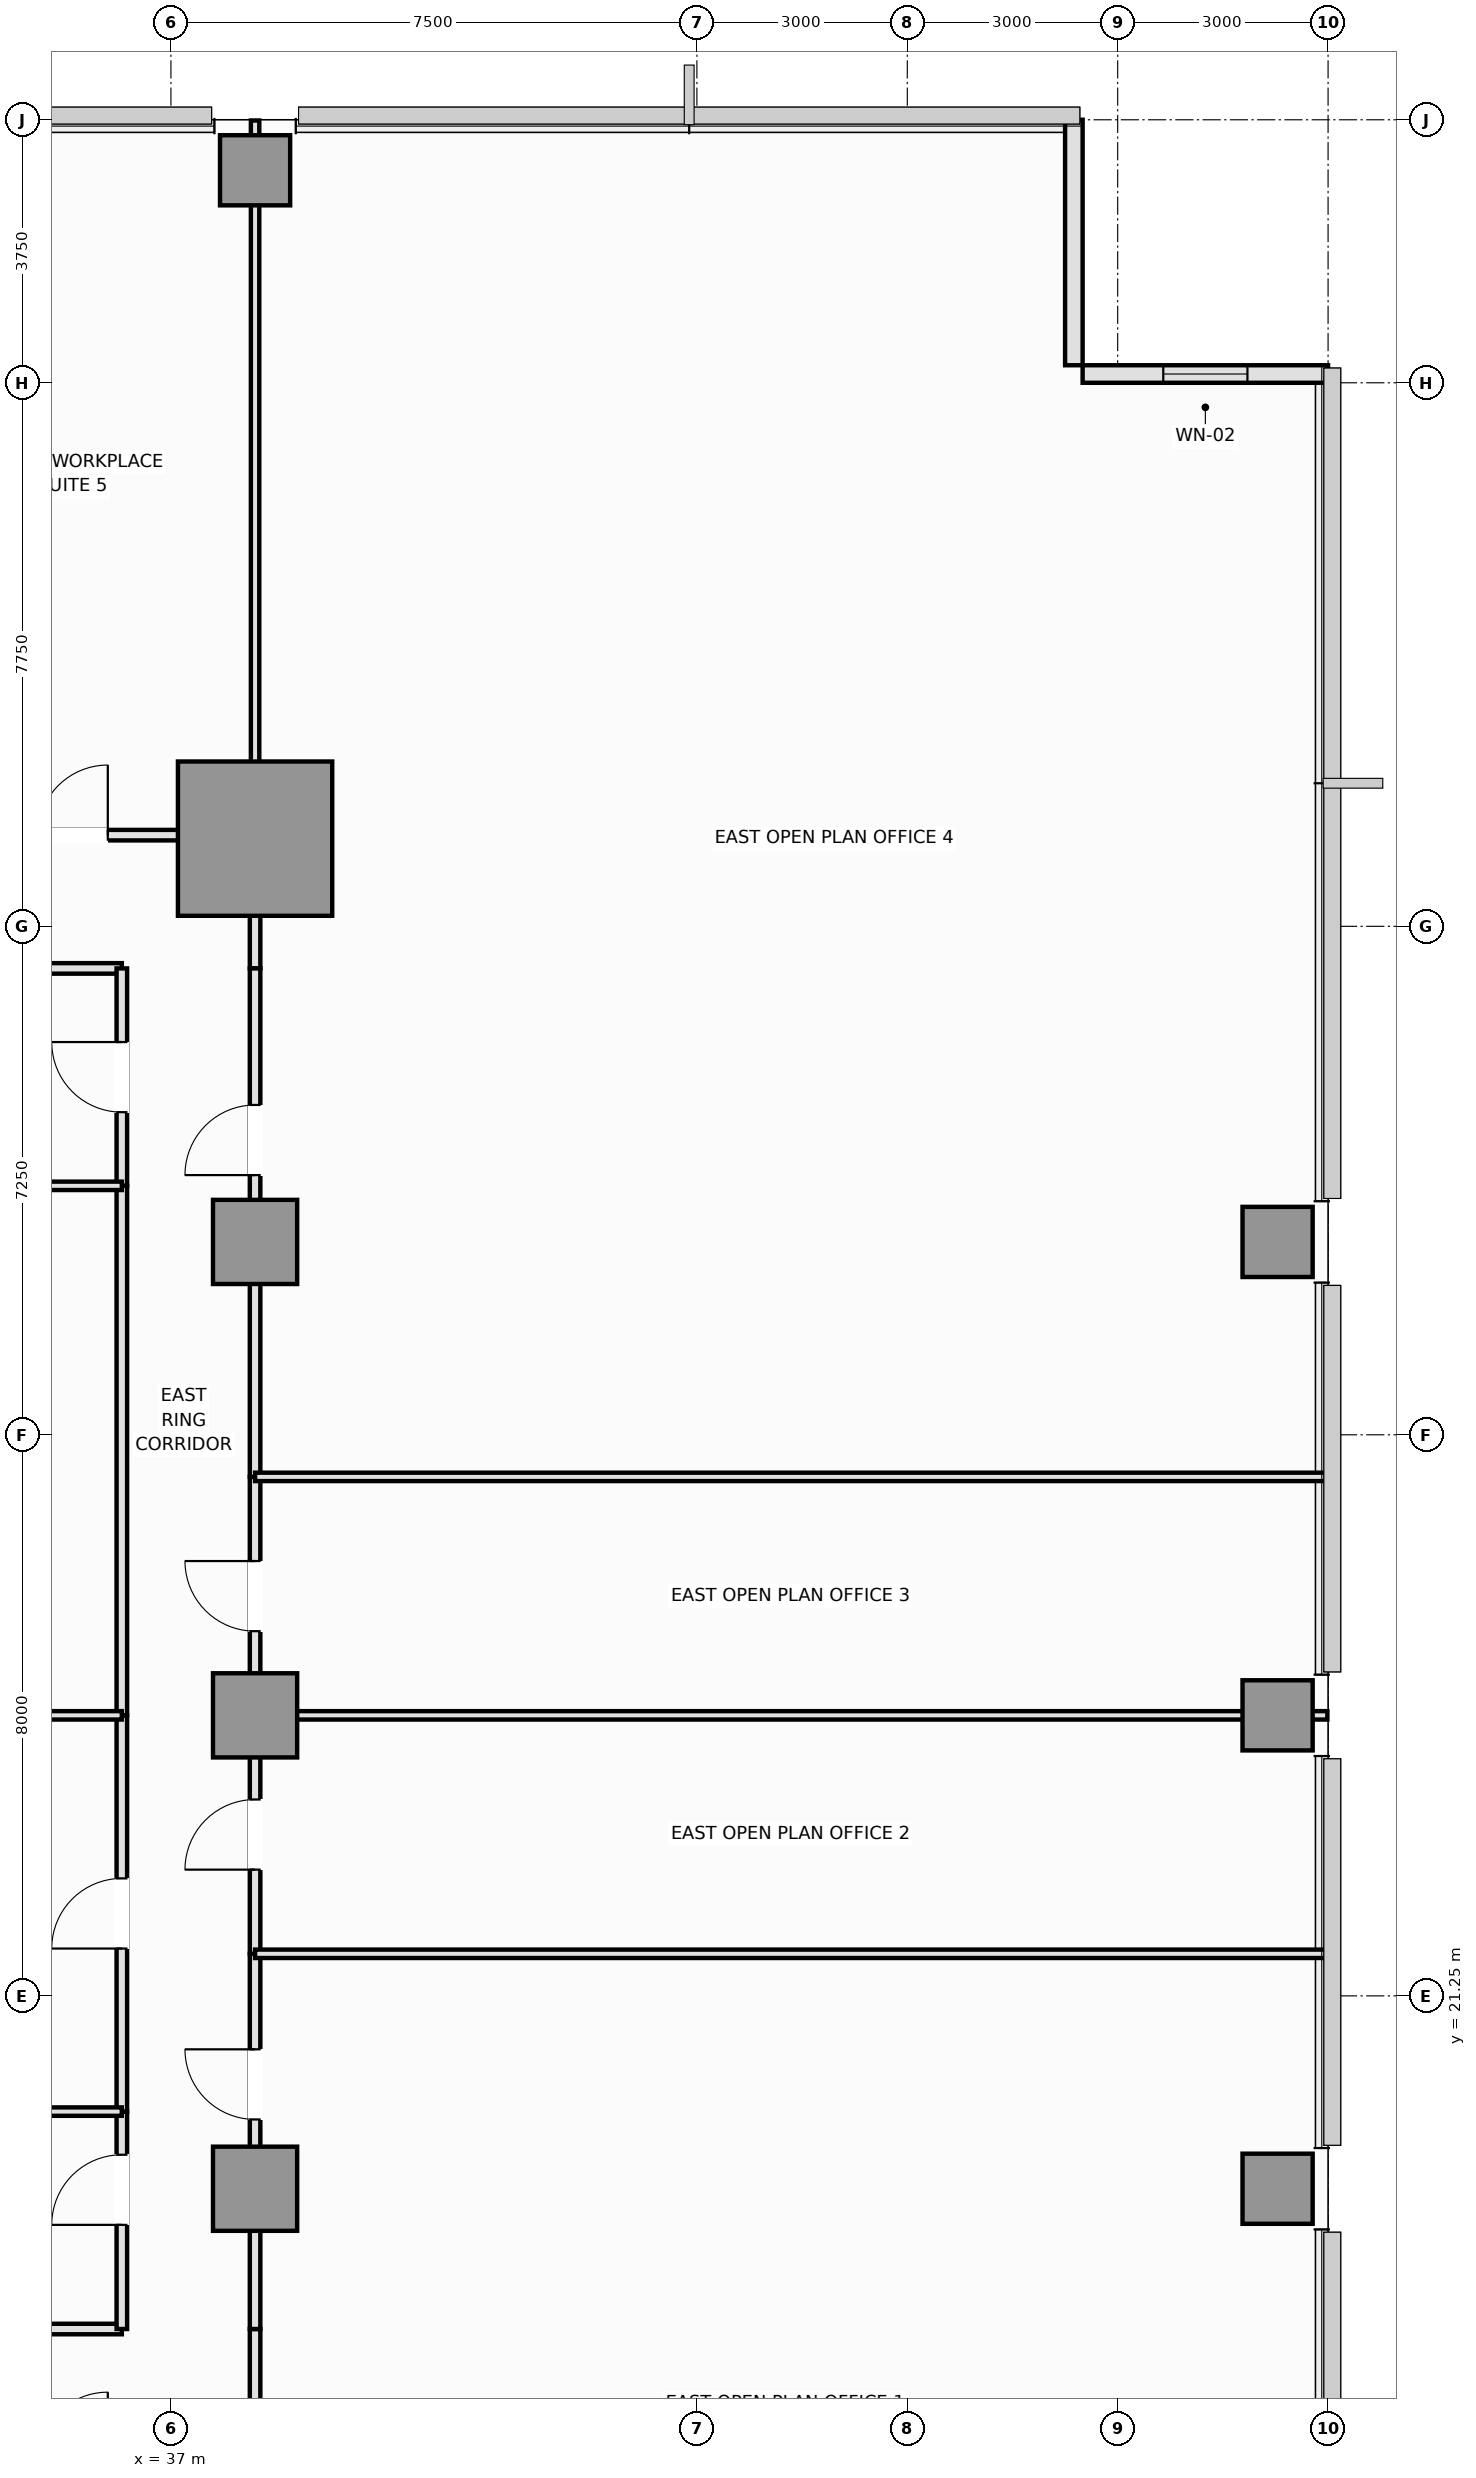
"""IFC4 building model, lengths in metres.
Left out: names, types, materials, properties, quantities, classifications, styles, units other than length and angle.
Written with IfcOpenShell. Run it as: python <this file> out.ifc"""

import sys

from ifc_helpers import new_model, si_unit, direction, frame, frame_2d, origin, origin_2d, place, context, subcontext, project, spatial, rectangle, extrude, element, fill, save


model = new_model("IFC4")
c1 = context("Model", 3, precision=1e-05, world=origin(), true_north=direction((0.0, 1.0)))
c2 = subcontext(c1, "Body", "Model", "MODEL_VIEW")
j1 = project(units=[si_unit("LENGTHUNIT", "METRE"), si_unit("PLANEANGLEUNIT", "RADIAN")], contexts=[c1])
p1 = place(None, origin())
s1 = spatial("IfcSite", under=j1, at=p1, CompositionType="ELEMENT")
p2 = place(p1, origin())
s2 = spatial("IfcBuilding", under=s1, at=p2, CompositionType="ELEMENT")
p3 = place(p2, frame((0.0, 0.0, 57.55)))
s3 = spatial("IfcBuildingStorey", under=s2, at=p3, CompositionType="ELEMENT", Elevation=57.55)
p4 = place(p3, frame((38.2, 37.75, 0.0), z_axis=(0.0, 0.0, 1.0), x_axis=(1.0, 0.0, 0.0)))
e1 = element("IfcColumn", 1, at=p4, inside=s3, PredefinedType="COLUMN", context=c2, shape_type="SweptSolid", body=[
    extrude(rectangle(XDim=2.2, YDim=2.2, at=origin_2d()), origin(), (0.0, 0.0, 1.0), 3.55),
])
for number, where, z_axis, x_axis in (
    (2, (38.2, 18.5, 0.0), (0.0, 0.0, 1.0), (1.0, 0.0, 0.0)),
    (3, (38.2, 25.25, 0.0), (0.0, 0.0, 1.0), (1.0, 0.0, 0.0)),
    (4, (38.2, 32.0, 0.0), (0.0, 0.0, 1.0), (1.0, 0.0, 0.0)),
):
    element("IfcColumn", number, at=place(p3, frame(where, z_axis=z_axis, x_axis=x_axis)), inside=s3, PredefinedType="COLUMN", context=c2, shape_type="SweptSolid", body=[
        extrude(rectangle(XDim=1.2, YDim=1.2, at=origin_2d()), origin(), (0.0, 0.0, 1.0), 3.55),
    ])
for number, where, z_axis, x_axis in (
    (5, (52.78, 18.5, 0.0), (0.0, 0.0, 1.0), (1.0, 0.0, 0.0)),
    (6, (52.78, 25.25, 0.0), (0.0, 0.0, 1.0), (1.0, 0.0, 0.0)),
    (7, (52.78, 32.0, 0.0), (0.0, 0.0, 1.0), (1.0, 0.0, 0.0)),
    (8, (38.2, 47.28, 0.0), (0.0, 0.0, 1.0), (1.0, 0.0, 0.0)),
):
    element("IfcColumn", number, at=place(p3, frame(where, z_axis=z_axis, x_axis=x_axis)), inside=s3, PredefinedType="COLUMN", context=c2, shape_type="SweptSolid", body=[
        extrude(rectangle(XDim=1.0, YDim=1.0, at=origin_2d()), origin(), (0.0, 0.0, 1.0), 3.55),
    ])
p5 = place(p3, frame((53.5, 44.375, 0.0), z_axis=(0.0, 0.0, 1.0), x_axis=(-1.0, 0.0, 0.0)))
e9 = element("IfcWall", 9, at=p5, inside=s3, PredefinedType="SOLIDWALL", context=c2, shape_type="SweptSolid", body=[
    extrude(rectangle(XDim=3.5, YDim=0.25, at=frame_2d((1.75, 0.0))), origin(), (0.0, 0.0, 1.0), 3.37),
])
p6 = place(p5, frame((1.15, 0.0, 0.9)))
e10 = element("IfcOpeningElement", 10, at=p6, cuts=e9, PredefinedType="OPENING", context=c2, shape_type="SweptSolid", body=[
    extrude(rectangle(XDim=1.2, YDim=1.8, at=frame_2d((0.6, 0.9))), frame((0.0, 0.135, 0.0), z_axis=(0.0, -1.0, 0.0), x_axis=(1.0, 0.0, 0.0)), (0.0, 0.0, 1.0), 0.27),
])
p7 = place(p3, frame((49.875, 44.5, 0.0), z_axis=(0.0, 0.0, 1.0), x_axis=(0.0, 1.0, 0.0)))
e11 = element("IfcWall", 11, at=p7, inside=s3, PredefinedType="SOLIDWALL", context=c2, shape_type="SweptSolid", body=[
    extrude(rectangle(XDim=3.5, YDim=0.25, at=frame_2d((1.75, 0.0))), origin(), (0.0, 0.0, 1.0), 3.37),
])
p8 = place(p3, frame((29.8, 16.5, 0.0), z_axis=(0.0, 0.0, 1.0), x_axis=(1.0, 0.0, 0.0)))
e12 = element("IfcWall", 12, at=p8, inside=s3, PredefinedType="PARTITIONING", context=c2, shape_type="SweptSolid", body=[
    extrude(rectangle(XDim=6.5, YDim=0.15, at=frame_2d((3.25, 0.0))), origin(), (0.0, 0.0, 1.0), 3.37),
])
p9 = place(p3, frame((38.2, 14.6, 0.0), z_axis=(0.0, 0.0, 1.0), x_axis=(0.0, 1.0, 0.0)))
e13 = element("IfcWall", 13, at=p9, inside=s3, PredefinedType="PARTITIONING", context=c2, shape_type="SweptSolid", body=[
    extrude(rectangle(XDim=1.9, YDim=0.15, at=frame_2d((0.95, 0.0))), origin(), (0.0, 0.0, 1.0), 2.82),
])
p10 = place(p3, frame((29.8, 35.9, 0.0), z_axis=(0.0, 0.0, 1.0), x_axis=(1.0, 0.0, 0.0)))
e14 = element("IfcWall", 14, at=p10, inside=s3, PredefinedType="PARTITIONING", context=c2, shape_type="SweptSolid", body=[
    extrude(rectangle(XDim=6.5, YDim=0.15, at=frame_2d((3.25, 0.0))), origin(), (0.0, 0.0, 1.0), 3.37),
])
p11 = place(p3, frame((33.0, 37.8, 0.0), z_axis=(0.0, 0.0, 1.0), x_axis=(1.0, 0.0, 0.0)))
e15 = element("IfcWall", 15, at=p11, inside=s3, PredefinedType="PARTITIONING", context=c2, shape_type="SweptSolid", body=[
    extrude(rectangle(XDim=5.2, YDim=0.15, at=frame_2d((2.6, 0.0))), origin(), (0.0, 0.0, 1.0), 2.72),
])
p12 = place(p11, frame((2.1, 0.0, 0.0)))
e16 = element("IfcOpeningElement", 16, at=p12, cuts=e15, PredefinedType="OPENING", context=c2, shape_type="SweptSolid", body=[
    extrude(rectangle(XDim=1.0, YDim=2.15, at=frame_2d((0.5, 1.075))), frame((0.0, 0.085, 0.0), z_axis=(0.0, -1.0, 0.0), x_axis=(1.0, 0.0, 0.0)), (0.0, 0.0, 1.0), 0.17),
])
p13 = place(p3, frame((38.2, 35.9, 0.0), z_axis=(0.0, 0.0, 1.0), x_axis=(0.0, 1.0, 0.0)))
e17 = element("IfcWall", 17, at=p13, inside=s3, PredefinedType="PARTITIONING", context=c2, shape_type="SweptSolid", body=[
    extrude(rectangle(XDim=1.9, YDim=0.15, at=frame_2d((0.95, 0.0))), origin(), (0.0, 0.0, 1.0), 2.82),
])
p14 = place(p3, frame((36.3, 16.5, 0.0), z_axis=(0.0, 0.0, 1.0), x_axis=(0.0, 1.0, 0.0)))
e18 = element("IfcWall", 18, at=p14, inside=s3, PredefinedType="PARTITIONING", context=c2, shape_type="SweptSolid", body=[
    extrude(rectangle(XDim=3.1, YDim=0.15, at=frame_2d((1.55, 0.0))), origin(), (0.0, 0.0, 1.0), 3.37),
])
p15 = place(p14, frame((1.485, 0.0, 0.0)))
e19 = element("IfcOpeningElement", 19, at=p15, cuts=e18, PredefinedType="OPENING", context=c2, shape_type="SweptSolid", body=[
    extrude(rectangle(XDim=1.0, YDim=2.15, at=frame_2d((0.5, 1.075))), frame((0.0, 0.085, 0.0), z_axis=(0.0, -1.0, 0.0), x_axis=(1.0, 0.0, 0.0)), (0.0, 0.0, 1.0), 0.17),
])
p16 = place(p3, frame((36.3, 32.8, 0.0), z_axis=(0.0, 0.0, 1.0), x_axis=(0.0, 1.0, 0.0)))
e20 = element("IfcWall", 20, at=p16, inside=s3, PredefinedType="PARTITIONING", context=c2, shape_type="SweptSolid", body=[
    extrude(rectangle(XDim=3.1, YDim=0.15, at=frame_2d((1.55, 0.0))), origin(), (0.0, 0.0, 1.0), 3.37),
])
p17 = place(p16, frame((1.05, 0.0, 0.0)))
e21 = element("IfcOpeningElement", 21, at=p17, cuts=e20, PredefinedType="OPENING", context=c2, shape_type="SweptSolid", body=[
    extrude(rectangle(XDim=1.0, YDim=2.15, at=frame_2d((0.5, 1.075))), frame((0.0, 0.085, 0.0), z_axis=(0.0, -1.0, 0.0), x_axis=(1.0, 0.0, 0.0)), (0.0, 0.0, 1.0), 0.17),
])
p18 = place(p3, frame((36.3, 19.6, 0.0), z_axis=(0.0, 0.0, 1.0), x_axis=(0.0, 1.0, 0.0)))
e22 = element("IfcWall", 22, at=p18, inside=s3, PredefinedType="PARTITIONING", context=c2, shape_type="SweptSolid", body=[
    extrude(rectangle(XDim=5.65, YDim=0.15, at=frame_2d((2.825, 0.0))), origin(), (0.0, 0.0, 1.0), 3.37),
])
p19 = place(p18, frame((2.325, 0.0, 0.0)))
e23 = element("IfcOpeningElement", 23, at=p19, cuts=e22, PredefinedType="OPENING", context=c2, shape_type="SweptSolid", body=[
    extrude(rectangle(XDim=1.0, YDim=2.15, at=frame_2d((0.5, 1.075))), frame((0.0, 0.085, 0.0), z_axis=(0.0, -1.0, 0.0), x_axis=(1.0, 0.0, 0.0)), (0.0, 0.0, 1.0), 0.17),
])
p20 = place(p3, frame((36.3, 25.25, 0.0), z_axis=(0.0, 0.0, 1.0), x_axis=(0.0, 1.0, 0.0)))
e24 = element("IfcWall", 24, at=p20, inside=s3, PredefinedType="PARTITIONING", context=c2, shape_type="SweptSolid", body=[
    extrude(rectangle(XDim=7.55, YDim=0.15, at=frame_2d((3.775, 0.0))), origin(), (0.0, 0.0, 1.0), 3.37),
])
p21 = place(p3, frame((38.2, 16.5, 0.0), z_axis=(0.0, 0.0, 1.0), x_axis=(0.0, 1.0, 0.0)))
e25 = element("IfcWall", 25, at=p21, inside=s3, PredefinedType="PARTITIONING", context=c2, shape_type="SweptSolid", body=[
    extrude(rectangle(XDim=5.35, YDim=0.15, at=frame_2d((2.675, 0.0))), origin(), (0.0, 0.0, 1.0), 2.82),
])
p22 = place(p21, frame((2.988, 0.0, 0.0)))
e26 = element("IfcOpeningElement", 26, at=p22, cuts=e25, PredefinedType="OPENING", context=c2, shape_type="SweptSolid", body=[
    extrude(rectangle(XDim=1.0, YDim=2.15, at=frame_2d((0.5, 1.075))), frame((0.0, 0.085, 0.0), z_axis=(0.0, -1.0, 0.0), x_axis=(1.0, 0.0, 0.0)), (0.0, 0.0, 1.0), 0.17),
])
p23 = place(p3, frame((38.2, 21.85, 0.0), z_axis=(0.0, 0.0, 1.0), x_axis=(0.0, 1.0, 0.0)))
e27 = element("IfcWall", 27, at=p23, inside=s3, PredefinedType="PARTITIONING", context=c2, shape_type="SweptSolid", body=[
    extrude(rectangle(XDim=3.4, YDim=0.15, at=frame_2d((1.7, 0.0))), origin(), (0.0, 0.0, 1.0), 2.82),
])
p24 = place(p23, frame((1.2, 0.0, 0.0)))
e28 = element("IfcOpeningElement", 28, at=p24, cuts=e27, PredefinedType="OPENING", context=c2, shape_type="SweptSolid", body=[
    extrude(rectangle(XDim=1.0, YDim=2.15, at=frame_2d((0.5, 1.075))), frame((0.0, 0.085, 0.0), z_axis=(0.0, -1.0, 0.0), x_axis=(1.0, 0.0, 0.0)), (0.0, 0.0, 1.0), 0.17),
])
p25 = place(p3, frame((38.2, 25.25, 0.0), z_axis=(0.0, 0.0, 1.0), x_axis=(0.0, 1.0, 0.0)))
e29 = element("IfcWall", 29, at=p25, inside=s3, PredefinedType="PARTITIONING", context=c2, shape_type="SweptSolid", body=[
    extrude(rectangle(XDim=3.4, YDim=0.15, at=frame_2d((1.7, 0.0))), origin(), (0.0, 0.0, 1.0), 2.82),
])
p26 = place(p25, frame((1.2, 0.0, 0.0)))
e30 = element("IfcOpeningElement", 30, at=p26, cuts=e29, PredefinedType="OPENING", context=c2, shape_type="SweptSolid", body=[
    extrude(rectangle(XDim=1.0, YDim=2.15, at=frame_2d((0.5, 1.075))), frame((0.0, 0.085, 0.0), z_axis=(0.0, -1.0, 0.0), x_axis=(1.0, 0.0, 0.0)), (0.0, 0.0, 1.0), 0.17),
])
p27 = place(p3, frame((38.2, 28.65, 0.0), z_axis=(0.0, 0.0, 1.0), x_axis=(0.0, 1.0, 0.0)))
e31 = element("IfcWall", 31, at=p27, inside=s3, PredefinedType="PARTITIONING", context=c2, shape_type="SweptSolid", body=[
    extrude(rectangle(XDim=7.25, YDim=0.15, at=frame_2d((3.625, 0.0))), origin(), (0.0, 0.0, 1.0), 2.82),
])
p28 = place(p27, frame((4.303, 0.0, 0.0)))
e32 = element("IfcOpeningElement", 32, at=p28, cuts=e31, PredefinedType="OPENING", context=c2, shape_type="SweptSolid", body=[
    extrude(rectangle(XDim=1.0, YDim=2.15, at=frame_2d((0.5, 1.075))), frame((0.0, 0.085, 0.0), z_axis=(0.0, -1.0, 0.0), x_axis=(1.0, 0.0, 0.0)), (0.0, 0.0, 1.0), 0.17),
])
for number, where, z_axis, x_axis in (
    (33, (29.8, 19.6, 0.0), (0.0, 0.0, 1.0), (1.0, 0.0, 0.0)),
    (34, (29.8, 32.8, 0.0), (0.0, 0.0, 1.0), (1.0, 0.0, 0.0)),
):
    element("IfcWall", number, at=place(p3, frame(where, z_axis=z_axis, x_axis=x_axis)), inside=s3, PredefinedType="PARTITIONING", context=c2, shape_type="SweptSolid", body=[
        extrude(rectangle(XDim=6.5, YDim=0.12, at=frame_2d((3.25, 0.0))), origin(), (0.0, 0.0, 1.0), 3.37),
    ])
p29 = place(p3, frame((27.5, 25.25, 0.0), z_axis=(0.0, 0.0, 1.0), x_axis=(1.0, 0.0, 0.0)))
e35 = element("IfcWall", 35, at=p29, inside=s3, PredefinedType="PARTITIONING", context=c2, shape_type="SweptSolid", body=[
    extrude(rectangle(XDim=8.8, YDim=0.12, at=frame_2d((4.4, 0.0))), origin(), (0.0, 0.0, 1.0), 2.72),
])
p30 = place(p3, frame((38.2, 37.8, 0.0), z_axis=(0.0, 0.0, 1.0), x_axis=(0.0, 1.0, 0.0)))
e36 = element("IfcWall", 36, at=p30, inside=s3, PredefinedType="PARTITIONING", context=c2, shape_type="SweptSolid", body=[
    extrude(rectangle(XDim=10.19, YDim=0.12, at=frame_2d((5.095, 0.0))), origin(), (0.0, 0.0, 1.0), 2.82),
])
p31 = place(p3, frame((38.2, 21.85, 0.0), z_axis=(0.0, 0.0, 1.0), x_axis=(1.0, 0.0, 0.0)))
e37 = element("IfcWall", 37, at=p31, inside=s3, PredefinedType="PARTITIONING", context=c2, shape_type="SweptSolid", body=[
    extrude(rectangle(XDim=15.29, YDim=0.12, at=frame_2d((7.645, 0.0))), origin(), (0.0, 0.0, 1.0), 3.37),
])
p32 = place(p3, frame((38.2, 25.25, 0.0), z_axis=(0.0, 0.0, 1.0), x_axis=(1.0, 0.0, 0.0)))
e38 = element("IfcWall", 38, at=p32, inside=s3, PredefinedType="PARTITIONING", context=c2, shape_type="SweptSolid", body=[
    extrude(rectangle(XDim=15.29, YDim=0.12, at=frame_2d((7.645, 0.0))), origin(), (0.0, 0.0, 1.0), 2.72),
])
p33 = place(p3, frame((38.2, 28.65, 0.0), z_axis=(0.0, 0.0, 1.0), x_axis=(1.0, 0.0, 0.0)))
e39 = element("IfcWall", 39, at=p33, inside=s3, PredefinedType="PARTITIONING", context=c2, shape_type="SweptSolid", body=[
    extrude(rectangle(XDim=15.29, YDim=0.12, at=frame_2d((7.645, 0.0))), origin(), (0.0, 0.0, 1.0), 3.37),
])
p34 = place(p6, origin())
e40 = element("IfcWindow", 40, at=p34, inside=s3, PartitioningType="SINGLE_PANEL", PredefinedType="WINDOW", context=c2, shape_type="SweptSolid", body=[
    extrude(rectangle(XDim=1.2, YDim=1.8, at=frame_2d((0.6, 0.9))), frame((0.0, 0.03, 0.0), z_axis=(0.0, -1.0, 0.0), x_axis=(1.0, 0.0, 0.0)), (0.0, 0.0, 1.0), 0.06),
])
fill(e10, e40)
p35 = place(p12, origin())
e41 = element("IfcDoor", 41, at=p35, inside=s3, OperationType="SINGLE_SWING_RIGHT", PredefinedType="DOOR", context=c2, shape_type="SweptSolid", body=[
    extrude(rectangle(XDim=1.0, YDim=2.15, at=frame_2d((0.5, 1.075))), frame((0.0, 0.025, 0.0), z_axis=(0.0, -1.0, 0.0), x_axis=(1.0, 0.0, 0.0)), (0.0, 0.0, 1.0), 0.05),
])
fill(e16, e41)
p36 = place(p15, origin())
e42 = element("IfcDoor", 42, at=p36, inside=s3, OperationType="SINGLE_SWING_LEFT", PredefinedType="DOOR", context=c2, shape_type="SweptSolid", body=[
    extrude(rectangle(XDim=1.0, YDim=2.15, at=frame_2d((0.5, 1.075))), frame((0.0, 0.025, 0.0), z_axis=(0.0, -1.0, 0.0), x_axis=(1.0, 0.0, 0.0)), (0.0, 0.0, 1.0), 0.05),
])
fill(e19, e42)
p37 = place(p17, origin())
e43 = element("IfcDoor", 43, at=p37, inside=s3, OperationType="SINGLE_SWING_RIGHT", PredefinedType="DOOR", context=c2, shape_type="SweptSolid", body=[
    extrude(rectangle(XDim=1.0, YDim=2.15, at=frame_2d((0.5, 1.075))), frame((0.0, 0.025, 0.0), z_axis=(0.0, -1.0, 0.0), x_axis=(1.0, 0.0, 0.0)), (0.0, 0.0, 1.0), 0.05),
])
fill(e21, e43)
p38 = place(p19, origin())
e44 = element("IfcDoor", 44, at=p38, inside=s3, OperationType="SINGLE_SWING_LEFT", PredefinedType="DOOR", context=c2, shape_type="SweptSolid", body=[
    extrude(rectangle(XDim=1.0, YDim=2.15, at=frame_2d((0.5, 1.075))), frame((0.0, 0.025, 0.0), z_axis=(0.0, -1.0, 0.0), x_axis=(1.0, 0.0, 0.0)), (0.0, 0.0, 1.0), 0.05),
])
fill(e23, e44)
p39 = place(p22, origin())
e45 = element("IfcDoor", 45, at=p39, inside=s3, OperationType="SINGLE_SWING_RIGHT", PredefinedType="DOOR", context=c2, shape_type="SweptSolid", body=[
    extrude(rectangle(XDim=1.0, YDim=2.15, at=frame_2d((0.5, 1.075))), frame((0.0, 0.025, 0.0), z_axis=(0.0, -1.0, 0.0), x_axis=(1.0, 0.0, 0.0)), (0.0, 0.0, 1.0), 0.05),
])
fill(e26, e45)
p40 = place(p24, origin())
e46 = element("IfcDoor", 46, at=p40, inside=s3, OperationType="SINGLE_SWING_LEFT", PredefinedType="DOOR", context=c2, shape_type="SweptSolid", body=[
    extrude(rectangle(XDim=1.0, YDim=2.15, at=frame_2d((0.5, 1.075))), frame((0.0, 0.025, 0.0), z_axis=(0.0, -1.0, 0.0), x_axis=(1.0, 0.0, 0.0)), (0.0, 0.0, 1.0), 0.05),
])
fill(e28, e46)
p41 = place(p26, origin())
e47 = element("IfcDoor", 47, at=p41, inside=s3, OperationType="SINGLE_SWING_RIGHT", PredefinedType="DOOR", context=c2, shape_type="SweptSolid", body=[
    extrude(rectangle(XDim=1.0, YDim=2.15, at=frame_2d((0.5, 1.075))), frame((0.0, 0.025, 0.0), z_axis=(0.0, -1.0, 0.0), x_axis=(1.0, 0.0, 0.0)), (0.0, 0.0, 1.0), 0.05),
])
fill(e30, e47)
p42 = place(p28, origin())
e48 = element("IfcDoor", 48, at=p42, inside=s3, OperationType="SINGLE_SWING_LEFT", PredefinedType="DOOR", context=c2, shape_type="SweptSolid", body=[
    extrude(rectangle(XDim=1.0, YDim=2.15, at=frame_2d((0.5, 1.075))), frame((0.0, 0.025, 0.0), z_axis=(0.0, -1.0, 0.0), x_axis=(1.0, 0.0, 0.0)), (0.0, 0.0, 1.0), 0.05),
])
fill(e32, e48)
save(model, sys.argv[1])
